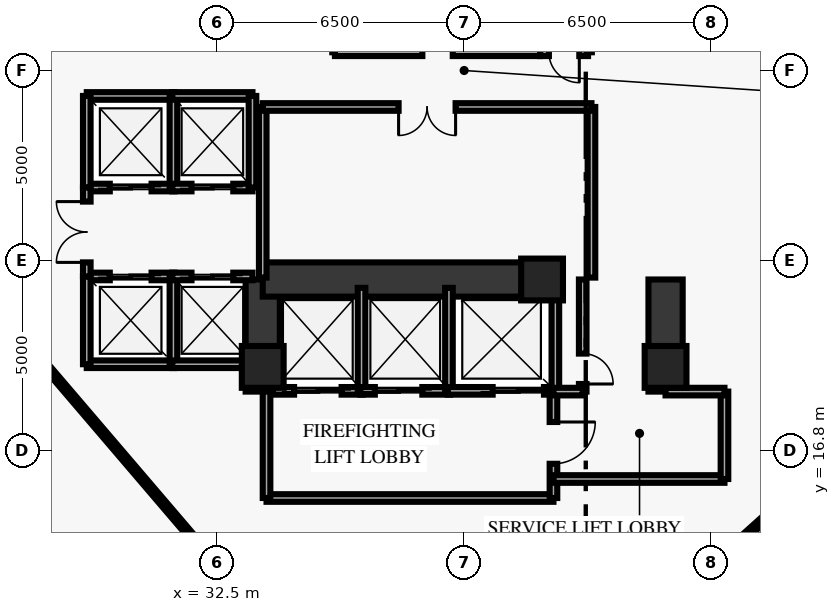
"""IFC4 building model, lengths in metres.
Left out: names, types, materials, properties, quantities, classifications, styles, units other than length and angle.
Written with IfcOpenShell. Run it as: python <this file> out.ifc"""

import sys

from ifc_helpers import new_model, si_unit, direction, frame, frame_2d, origin, origin_2d, place, context, subcontext, project, spatial, rectangle, extrude, element, fill, save


model = new_model("IFC4")
c1 = context("Model", 3, precision=1e-05, world=origin(), true_north=direction((0.0, 1.0)))
c2 = subcontext(c1, "Body", "Model", "MODEL_VIEW")
j1 = project(units=[si_unit("LENGTHUNIT", "METRE"), si_unit("PLANEANGLEUNIT", "RADIAN")], contexts=[c1])
p1 = place(None, origin())
s1 = spatial("IfcSite", under=j1, at=p1, CompositionType="ELEMENT")
p2 = place(p1, origin())
s2 = spatial("IfcBuilding", under=s1, at=p2, CompositionType="ELEMENT")
p3 = place(p2, frame((0.0, 0.0, -4.5)))
s3 = spatial("IfcBuildingStorey", under=s2, at=p3, CompositionType="ELEMENT", Elevation=-4.5)
for number, where, z_axis, x_axis in (
    (1, (33.7, 19.0, 0.0), (0.0, 0.0, 1.0), (1.0, 0.0, 0.0)),
    (2, (41.05, 21.3, 0.0), (0.0, 0.0, 1.0), (1.0, 0.0, 0.0)),
    (3, (44.3, 19.0, 0.0), (0.0, 0.0, 1.0), (1.0, 0.0, 0.0)),
):
    element("IfcColumn", number, at=place(p3, frame(where, z_axis=z_axis, x_axis=x_axis)), inside=s3, PredefinedType="PILASTER", context=c2, shape_type="SweptSolid", body=[
        extrude(rectangle(XDim=1.1, YDim=1.1, at=origin_2d()), origin(), (0.0, 0.0, 1.0), 4.18),
    ])
for number, where, z_axis, x_axis in (
    (4, (33.7, 18.35, 0.0), (0.0, 0.0, 1.0), (0.0, 1.0, 0.0)),
    (5, (44.3, 18.35, 0.0), (0.0, 0.0, 1.0), (0.0, 1.0, 0.0)),
):
    element("IfcWall", number, at=place(p3, frame(where, z_axis=z_axis, x_axis=x_axis)), inside=s3, PredefinedType="SHEAR", context=c2, shape_type="SweptSolid", body=[
        extrude(rectangle(XDim=2.95, YDim=0.9, at=frame_2d((1.475, 0.0))), origin(), (0.0, 0.0, 1.0), 4.18),
    ])
p4 = place(p3, frame((33.7, 21.3, 0.0), z_axis=(0.0, 0.0, 1.0), x_axis=(1.0, 0.0, 0.0)))
e6 = element("IfcWall", 6, at=p4, inside=s3, PredefinedType="SHEAR", context=c2, shape_type="SweptSolid", body=[
    extrude(rectangle(XDim=7.55, YDim=0.9, at=frame_2d((3.775, 0.0))), origin(), (0.0, 0.0, 1.0), 4.18),
])
p5 = place(p3, frame((41.0, 27.28, 0.0), z_axis=(0.0, 0.0, 1.0), x_axis=(1.0, 0.0, 0.0)))
e7 = element("IfcWall", 7, at=p5, inside=s3, PredefinedType="SOLIDWALL", context=c2, shape_type="SweptSolid", body=[
    extrude(rectangle(XDim=1.26, YDim=0.2, at=frame_2d((0.63, 0.0))), origin(), (0.0, 0.0, 1.0), 4.18),
])
p6 = place(p5, frame((0.23, 0.0, 0.0)))
e8 = element("IfcOpeningElement", 8, at=p6, cuts=e7, PredefinedType="OPENING", context=c2, shape_type="SweptSolid", body=[
    extrude(rectangle(XDim=0.8, YDim=2.05, at=frame_2d((0.4, 1.025))), frame((0.0, 0.11, 0.0), z_axis=(0.0, -1.0, 0.0), x_axis=(1.0, 0.0, 0.0)), (0.0, 0.0, 1.0), 0.22),
])
p7 = place(p3, frame((29.07, 23.72, 0.0), z_axis=(0.0, 0.0, 1.0), x_axis=(1.0, 0.0, 0.0)))
e9 = element("IfcWall", 9, at=p7, inside=s3, PredefinedType="SOLIDWALL", context=c2, shape_type="SweptSolid", body=[
    extrude(rectangle(XDim=2.31, YDim=0.2, at=frame_2d((1.155, 0.0))), origin(), (0.0, 0.0, 1.0), 4.18),
])
p8 = place(p7, frame((0.605, 0.0, 0.0)))
e10 = element("IfcOpeningElement", 10, at=p8, cuts=e9, PredefinedType="OPENING", context=c2, shape_type="SweptSolid", body=[
    extrude(rectangle(XDim=1.1, YDim=2.15, at=frame_2d((0.55, 1.075))), frame((0.0, 0.11, 0.0), z_axis=(0.0, -1.0, 0.0), x_axis=(1.0, 0.0, 0.0)), (0.0, 0.0, 1.0), 0.22),
])
p9 = place(p3, frame((29.07, 26.13, 0.0), z_axis=(0.0, 0.0, 1.0), x_axis=(1.0, 0.0, 0.0)))
e11 = element("IfcWall", 11, at=p9, inside=s3, PredefinedType="SOLIDWALL", context=c2, shape_type="SweptSolid", body=[
    extrude(rectangle(XDim=2.31, YDim=0.2, at=frame_2d((1.155, 0.0))), origin(), (0.0, 0.0, 1.0), 4.18),
])
for number, where, z_axis, x_axis in (
    (12, (29.07, 23.72, 0.0), (0.0, 0.0, 1.0), (0.0, 1.0, 0.0)),
    (13, (31.35, 23.72, 0.0), (0.0, 0.0, 1.0), (0.0, 1.0, 0.0)),
):
    element("IfcWall", number, at=place(p3, frame(where, z_axis=z_axis, x_axis=x_axis)), inside=s3, PredefinedType="SOLIDWALL", context=c2, shape_type="SweptSolid", body=[
        extrude(rectangle(XDim=2.41, YDim=0.2, at=frame_2d((1.205, 0.0))), origin(), (0.0, 0.0, 1.0), 4.18),
    ])
p10 = place(p3, frame((31.32, 23.72, 0.0), z_axis=(0.0, 0.0, 1.0), x_axis=(1.0, 0.0, 0.0)))
e14 = element("IfcWall", 14, at=p10, inside=s3, PredefinedType="SOLIDWALL", context=c2, shape_type="SweptSolid", body=[
    extrude(rectangle(XDim=2.11, YDim=0.2, at=frame_2d((1.055, 0.0))), origin(), (0.0, 0.0, 1.0), 4.18),
])
p11 = place(p10, frame((0.505, 0.0, 0.0)))
e15 = element("IfcOpeningElement", 15, at=p11, cuts=e14, PredefinedType="OPENING", context=c2, shape_type="SweptSolid", body=[
    extrude(rectangle(XDim=1.1, YDim=2.15, at=frame_2d((0.55, 1.075))), frame((0.0, 0.11, 0.0), z_axis=(0.0, -1.0, 0.0), x_axis=(1.0, 0.0, 0.0)), (0.0, 0.0, 1.0), 0.22),
])
p12 = place(p3, frame((31.32, 26.13, 0.0), z_axis=(0.0, 0.0, 1.0), x_axis=(1.0, 0.0, 0.0)))
e16 = element("IfcWall", 16, at=p12, inside=s3, PredefinedType="SOLIDWALL", context=c2, shape_type="SweptSolid", body=[
    extrude(rectangle(XDim=2.11, YDim=0.2, at=frame_2d((1.055, 0.0))), origin(), (0.0, 0.0, 1.0), 4.18),
])
p13 = place(p3, frame((33.43, 23.72, 0.0), z_axis=(0.0, 0.0, 1.0), x_axis=(0.0, 1.0, 0.0)))
e17 = element("IfcWall", 17, at=p13, inside=s3, PredefinedType="SOLIDWALL", context=c2, shape_type="SweptSolid", body=[
    extrude(rectangle(XDim=2.41, YDim=0.2, at=frame_2d((1.205, 0.0))), origin(), (0.0, 0.0, 1.0), 4.18),
])
p14 = place(p3, frame((29.07, 19.07, 0.0), z_axis=(0.0, 0.0, 1.0), x_axis=(1.0, 0.0, 0.0)))
e18 = element("IfcWall", 18, at=p14, inside=s3, PredefinedType="SOLIDWALL", context=c2, shape_type="SweptSolid", body=[
    extrude(rectangle(XDim=2.31, YDim=0.2, at=frame_2d((1.155, 0.0))), origin(), (0.0, 0.0, 1.0), 4.18),
])
p15 = place(p3, frame((29.07, 21.38, 0.0), z_axis=(0.0, 0.0, 1.0), x_axis=(1.0, 0.0, 0.0)))
e19 = element("IfcWall", 19, at=p15, inside=s3, PredefinedType="SOLIDWALL", context=c2, shape_type="SweptSolid", body=[
    extrude(rectangle(XDim=2.31, YDim=0.2, at=frame_2d((1.155, 0.0))), origin(), (0.0, 0.0, 1.0), 4.18),
])
p16 = place(p15, frame((0.605, 0.0, 0.0)))
e20 = element("IfcOpeningElement", 20, at=p16, cuts=e19, PredefinedType="OPENING", context=c2, shape_type="SweptSolid", body=[
    extrude(rectangle(XDim=1.1, YDim=2.15, at=frame_2d((0.55, 1.075))), frame((0.0, 0.11, 0.0), z_axis=(0.0, -1.0, 0.0), x_axis=(1.0, 0.0, 0.0)), (0.0, 0.0, 1.0), 0.22),
])
for number, where, z_axis, x_axis in (
    (21, (29.07, 19.07, 0.0), (0.0, 0.0, 1.0), (0.0, 1.0, 0.0)),
    (22, (31.35, 19.07, 0.0), (0.0, 0.0, 1.0), (0.0, 1.0, 0.0)),
):
    element("IfcWall", number, at=place(p3, frame(where, z_axis=z_axis, x_axis=x_axis)), inside=s3, PredefinedType="SOLIDWALL", context=c2, shape_type="SweptSolid", body=[
        extrude(rectangle(XDim=2.31, YDim=0.2, at=frame_2d((1.155, 0.0))), origin(), (0.0, 0.0, 1.0), 4.18),
    ])
p17 = place(p3, frame((31.32, 19.07, 0.0), z_axis=(0.0, 0.0, 1.0), x_axis=(1.0, 0.0, 0.0)))
e23 = element("IfcWall", 23, at=p17, inside=s3, PredefinedType="SOLIDWALL", context=c2, shape_type="SweptSolid", body=[
    extrude(rectangle(XDim=2.11, YDim=0.2, at=frame_2d((1.055, 0.0))), origin(), (0.0, 0.0, 1.0), 4.18),
])
p18 = place(p3, frame((31.32, 21.38, 0.0), z_axis=(0.0, 0.0, 1.0), x_axis=(1.0, 0.0, 0.0)))
e24 = element("IfcWall", 24, at=p18, inside=s3, PredefinedType="SOLIDWALL", context=c2, shape_type="SweptSolid", body=[
    extrude(rectangle(XDim=2.11, YDim=0.2, at=frame_2d((1.055, 0.0))), origin(), (0.0, 0.0, 1.0), 4.18),
])
p19 = place(p18, frame((0.505, 0.0, 0.0)))
e25 = element("IfcOpeningElement", 25, at=p19, cuts=e24, PredefinedType="OPENING", context=c2, shape_type="SweptSolid", body=[
    extrude(rectangle(XDim=1.1, YDim=2.15, at=frame_2d((0.55, 1.075))), frame((0.0, 0.11, 0.0), z_axis=(0.0, -1.0, 0.0), x_axis=(1.0, 0.0, 0.0)), (0.0, 0.0, 1.0), 0.22),
])
p20 = place(p3, frame((33.97, 18.37, 0.0), z_axis=(0.0, 0.0, 1.0), x_axis=(1.0, 0.0, 0.0)))
e26 = element("IfcWall", 26, at=p20, inside=s3, PredefinedType="SOLIDWALL", context=c2, shape_type="SweptSolid", body=[
    extrude(rectangle(XDim=2.36, YDim=0.2, at=frame_2d((1.18, 0.0))), origin(), (0.0, 0.0, 1.0), 4.18),
])
p21 = place(p20, frame((0.555, 0.0, 0.0)))
e27 = element("IfcOpeningElement", 27, at=p21, cuts=e26, PredefinedType="OPENING", context=c2, shape_type="SweptSolid", body=[
    extrude(rectangle(XDim=1.25, YDim=2.2, at=frame_2d((0.625, 1.1))), frame((0.0, 0.11, 0.0), z_axis=(0.0, -1.0, 0.0), x_axis=(1.0, 0.0, 0.0)), (0.0, 0.0, 1.0), 0.22),
])
p22 = place(p3, frame((36.3, 18.37, 0.0), z_axis=(0.0, 0.0, 1.0), x_axis=(0.0, 1.0, 0.0)))
e28 = element("IfcWall", 28, at=p22, inside=s3, PredefinedType="SOLIDWALL", context=c2, shape_type="SweptSolid", body=[
    extrude(rectangle(XDim=2.71, YDim=0.2, at=frame_2d((1.355, 0.0))), origin(), (0.0, 0.0, 1.0), 4.18),
])
p23 = place(p3, frame((36.27, 18.37, 0.0), z_axis=(0.0, 0.0, 1.0), x_axis=(1.0, 0.0, 0.0)))
e29 = element("IfcWall", 29, at=p23, inside=s3, PredefinedType="SOLIDWALL", context=c2, shape_type="SweptSolid", body=[
    extrude(rectangle(XDim=2.36, YDim=0.2, at=frame_2d((1.18, 0.0))), origin(), (0.0, 0.0, 1.0), 4.18),
])
p24 = place(p23, frame((0.38, 0.0, 0.0)))
e30 = element("IfcOpeningElement", 30, at=p24, cuts=e29, PredefinedType="OPENING", context=c2, shape_type="SweptSolid", body=[
    extrude(rectangle(XDim=1.25, YDim=2.2, at=frame_2d((0.625, 1.1))), frame((0.0, 0.11, 0.0), z_axis=(0.0, -1.0, 0.0), x_axis=(1.0, 0.0, 0.0)), (0.0, 0.0, 1.0), 0.22),
])
p25 = place(p3, frame((38.6, 18.37, 0.0), z_axis=(0.0, 0.0, 1.0), x_axis=(0.0, 1.0, 0.0)))
e31 = element("IfcWall", 31, at=p25, inside=s3, PredefinedType="SOLIDWALL", context=c2, shape_type="SweptSolid", body=[
    extrude(rectangle(XDim=2.71, YDim=0.2, at=frame_2d((1.355, 0.0))), origin(), (0.0, 0.0, 1.0), 4.18),
])
p26 = place(p3, frame((38.57, 18.37, 0.0), z_axis=(0.0, 0.0, 1.0), x_axis=(1.0, 0.0, 0.0)))
e32 = element("IfcWall", 32, at=p26, inside=s3, PredefinedType="SOLIDWALL", context=c2, shape_type="SweptSolid", body=[
    extrude(rectangle(XDim=2.83, YDim=0.2, at=frame_2d((1.415, 0.0))), origin(), (0.0, 0.0, 1.0), 4.18),
])
p27 = place(p26, frame((1.18, 0.0, 0.0)))
e33 = element("IfcOpeningElement", 33, at=p27, cuts=e32, PredefinedType="OPENING", context=c2, shape_type="SweptSolid", body=[
    extrude(rectangle(XDim=1.35, YDim=2.18, at=frame_2d((0.675, 1.09))), frame((0.0, 0.11, 0.0), z_axis=(0.0, -1.0, 0.0), x_axis=(1.0, 0.0, 0.0)), (0.0, 0.0, 1.0), 0.22),
])
p28 = place(p3, frame((41.4, 18.37, 0.0), z_axis=(0.0, 0.0, 1.0), x_axis=(0.0, 1.0, 0.0)))
e34 = element("IfcWall", 34, at=p28, inside=s3, PredefinedType="SOLIDWALL", context=c2, shape_type="SweptSolid", body=[
    extrude(rectangle(XDim=2.71, YDim=0.2, at=frame_2d((1.355, 0.0))), origin(), (0.0, 0.0, 1.0), 4.18),
])
p29 = place(p3, frame((29.07, 21.38, 0.0), z_axis=(0.0, 0.0, 1.0), x_axis=(0.0, 1.0, 0.0)))
e35 = element("IfcWall", 35, at=p29, inside=s3, PredefinedType="SOLIDWALL", context=c2, shape_type="SweptSolid", body=[
    extrude(rectangle(XDim=2.34, YDim=0.2, at=frame_2d((1.17, 0.0))), origin(), (0.0, 0.0, 1.0), 4.18),
])
p30 = place(p29, frame((0.37, 0.0, 0.0)))
e36 = element("IfcOpeningElement", 36, at=p30, cuts=e35, PredefinedType="OPENING", context=c2, shape_type="SweptSolid", body=[
    extrude(rectangle(XDim=1.6, YDim=2.2, at=frame_2d((0.8, 1.1))), frame((0.0, 0.11, 0.0), z_axis=(0.0, -1.0, 0.0), x_axis=(1.0, 0.0, 0.0)), (0.0, 0.0, 1.0), 0.22),
])
p31 = place(p3, frame((33.7, 21.35, 0.0), z_axis=(0.0, 0.0, 1.0), x_axis=(0.0, 1.0, 0.0)))
e37 = element("IfcWall", 37, at=p31, inside=s3, PredefinedType="SOLIDWALL", context=c2, shape_type="SweptSolid", body=[
    extrude(rectangle(XDim=4.49, YDim=0.2, at=frame_2d((2.245, 0.0))), origin(), (0.0, 0.0, 1.0), 3.4),
])
p32 = place(p3, frame((42.35, 21.35, 0.0), z_axis=(0.0, 0.0, 1.0), x_axis=(0.0, 1.0, 0.0)))
e38 = element("IfcWall", 38, at=p32, inside=s3, PredefinedType="SOLIDWALL", context=c2, shape_type="SweptSolid", body=[
    extrude(rectangle(XDim=4.49, YDim=0.2, at=frame_2d((2.245, 0.0))), origin(), (0.0, 0.0, 1.0), 4.18),
])
p33 = place(p3, frame((42.35, 25.84, 0.0), z_axis=(0.0, 0.0, 1.0), x_axis=(-1.0, 0.0, 0.0)))
e39 = element("IfcWall", 39, at=p33, inside=s3, PredefinedType="SOLIDWALL", context=c2, shape_type="SweptSolid", body=[
    extrude(rectangle(XDim=8.65, YDim=0.2, at=frame_2d((4.325, 0.0))), origin(), (0.0, 0.0, 1.0), 4.18),
])
p34 = place(p33, frame((3.575, 0.0, 0.0)))
e40 = element("IfcOpeningElement", 40, at=p34, cuts=e39, PredefinedType="OPENING", context=c2, shape_type="SweptSolid", body=[
    extrude(rectangle(XDim=1.5, YDim=2.2, at=frame_2d((0.75, 1.1))), frame((0.0, 0.11, 0.0), z_axis=(0.0, -1.0, 0.0), x_axis=(1.0, 0.0, 0.0)), (0.0, 0.0, 1.0), 0.22),
])
p35 = place(p3, frame((35.6, 27.28, 0.0), z_axis=(0.0, 0.0, 1.0), x_axis=(1.0, 0.0, 0.0)))
e41 = element("IfcWall", 41, at=p35, inside=s3, PredefinedType="SOLIDWALL", context=c2, shape_type="SweptSolid", body=[
    extrude(rectangle(XDim=5.4, YDim=0.2, at=frame_2d((2.7, 0.0))), origin(), (0.0, 0.0, 1.0), 4.18),
])
p36 = place(p35, frame((2.3, 0.0, 0.0)))
e42 = element("IfcOpeningElement", 42, at=p36, cuts=e41, PredefinedType="OPENING", context=c2, shape_type="SweptSolid", body=[
    extrude(rectangle(XDim=0.8, YDim=2.05, at=frame_2d((0.4, 1.025))), frame((0.0, 0.11, 0.0), z_axis=(0.0, -1.0, 0.0), x_axis=(1.0, 0.0, 0.0)), (0.0, 0.0, 1.0), 0.22),
])
p37 = place(p3, frame((33.8, 15.55, 0.0), z_axis=(0.0, 0.0, 1.0), x_axis=(1.0, 0.0, 0.0)))
e43 = element("IfcWall", 43, at=p37, inside=s3, PredefinedType="SOLIDWALL", context=c2, shape_type="SweptSolid", body=[
    extrude(rectangle(XDim=7.55, YDim=0.2, at=frame_2d((3.775, 0.0))), origin(), (0.0, 0.0, 1.0), 4.18),
])
p38 = place(p3, frame((33.8, 15.55, 0.0), z_axis=(0.0, 0.0, 1.0), x_axis=(0.0, 1.0, 0.0)))
e44 = element("IfcWall", 44, at=p38, inside=s3, PredefinedType="SOLIDWALL", context=c2, shape_type="SweptSolid", body=[
    extrude(rectangle(XDim=2.8, YDim=0.2, at=frame_2d((1.4, 0.0))), origin(), (0.0, 0.0, 1.0), 4.18),
])
p39 = place(p3, frame((41.35, 15.55, 0.0), z_axis=(0.0, 0.0, 1.0), x_axis=(0.0, 1.0, 0.0)))
e45 = element("IfcWall", 45, at=p39, inside=s3, PredefinedType="SOLIDWALL", context=c2, shape_type="SweptSolid", body=[
    extrude(rectangle(XDim=2.8, YDim=0.2, at=frame_2d((1.4, 0.0))), origin(), (0.0, 0.0, 1.0), 4.18),
])
p40 = place(p39, frame((0.9, 0.0, 0.0)))
e46 = element("IfcOpeningElement", 46, at=p40, cuts=e45, PredefinedType="OPENING", context=c2, shape_type="SweptSolid", body=[
    extrude(rectangle(XDim=1.1, YDim=2.15, at=frame_2d((0.55, 1.075))), frame((0.0, 0.11, 0.0), z_axis=(0.0, -1.0, 0.0), x_axis=(1.0, 0.0, 0.0)), (0.0, 0.0, 1.0), 0.22),
])
p41 = place(p3, frame((41.35, 16.05, 0.0), z_axis=(0.0, 0.0, 1.0), x_axis=(1.0, 0.0, 0.0)))
e47 = element("IfcWall", 47, at=p41, inside=s3, PredefinedType="SOLIDWALL", context=c2, shape_type="SweptSolid", body=[
    extrude(rectangle(XDim=4.5, YDim=0.2, at=frame_2d((2.25, 0.0))), origin(), (0.0, 0.0, 1.0), 4.18),
])
p42 = place(p3, frame((45.85, 16.05, 0.0), z_axis=(0.0, 0.0, 1.0), x_axis=(0.0, 1.0, 0.0)))
e48 = element("IfcWall", 48, at=p42, inside=s3, PredefinedType="SOLIDWALL", context=c2, shape_type="SweptSolid", body=[
    extrude(rectangle(XDim=2.3, YDim=0.2, at=frame_2d((1.15, 0.0))), origin(), (0.0, 0.0, 1.0), 4.18),
])
p43 = place(p3, frame((44.3, 18.35, 0.0), z_axis=(0.0, 0.0, 1.0), x_axis=(1.0, 0.0, 0.0)))
e49 = element("IfcWall", 49, at=p43, inside=s3, PredefinedType="SOLIDWALL", context=c2, shape_type="SweptSolid", body=[
    extrude(rectangle(XDim=1.55, YDim=0.2, at=frame_2d((0.775, 0.0))), origin(), (0.0, 0.0, 1.0), 4.18),
])
p44 = place(p3, frame((42.12, 18.35, 0.0), z_axis=(0.0, 0.0, 1.0), x_axis=(0.0, 1.0, 0.0)))
e50 = element("IfcWall", 50, at=p44, inside=s3, PredefinedType="SOLIDWALL", context=c2, shape_type="SweptSolid", body=[
    extrude(rectangle(XDim=2.95, YDim=0.2, at=frame_2d((1.475, 0.0))), origin(), (0.0, 0.0, 1.0), 4.18),
])
p45 = place(p44, frame((0.2, 0.0, 0.0)))
e51 = element("IfcOpeningElement", 51, at=p45, cuts=e50, PredefinedType="OPENING", context=c2, shape_type="SweptSolid", body=[
    extrude(rectangle(XDim=0.8, YDim=2.05, at=frame_2d((0.4, 1.025))), frame((0.0, 0.11, 0.0), z_axis=(0.0, -1.0, 0.0), x_axis=(1.0, 0.0, 0.0)), (0.0, 0.0, 1.0), 0.22),
])
p46 = place(p3, frame((41.35, 18.35, 0.0), z_axis=(0.0, 0.0, 1.0), x_axis=(1.0, 0.0, 0.0)))
e52 = element("IfcWall", 52, at=p46, inside=s3, PredefinedType="SOLIDWALL", context=c2, shape_type="SweptSolid", body=[
    extrude(rectangle(XDim=0.77, YDim=0.2, at=frame_2d((0.385, 0.0))), origin(), (0.0, 0.0, 1.0), 4.18),
])
p47 = place(p3, frame((27.811, 19.24, 0.0), z_axis=(0.0, 0.0, 1.0), x_axis=(0.649652680018, -0.760231145998, 0.0)))
e53 = element("IfcWall", 53, at=p47, inside=s3, PredefinedType="PARTITIONING", context=c2, shape_type="SweptSolid", body=[
    extrude(rectangle(XDim=7.279, YDim=0.16, at=frame_2d((3.64, 0.0))), origin(), (0.0, 0.0, 1.0), 4.18),
])
p48 = place(p3, frame((45.46, 13.706, 0.0), z_axis=(0.0, 0.0, 1.0), x_axis=(0.744066617248, 0.668105432621, 0.0)))
e54 = element("IfcWall", 54, at=p48, inside=s3, PredefinedType="PARTITIONING", context=c2, shape_type="SweptSolid", body=[
    extrude(rectangle(XDim=3.596, YDim=0.16, at=frame_2d((1.798, 0.0))), origin(), (0.0, 0.0, 1.0), 4.18),
])
p49 = place(p6, origin())
e55 = element("IfcDoor", 55, at=p49, inside=s3, OperationType="SINGLE_SWING_RIGHT", PredefinedType="DOOR", context=c2, shape_type="SweptSolid", body=[
    extrude(rectangle(XDim=0.8, YDim=2.05, at=frame_2d((0.4, 1.025))), frame((0.0, 0.025, 0.0), z_axis=(0.0, -1.0, 0.0), x_axis=(1.0, 0.0, 0.0)), (0.0, 0.0, 1.0), 0.05),
])
fill(e8, e55)
p50 = place(p8, origin())
e56 = element("IfcDoor", 56, at=p50, inside=s3, OperationType="DOUBLE_DOOR_SLIDING", PredefinedType="DOOR", context=c2, shape_type="SweptSolid", body=[
    extrude(rectangle(XDim=1.1, YDim=2.15, at=frame_2d((0.55, 1.075))), frame((0.0, 0.025, 0.0), z_axis=(0.0, -1.0, 0.0), x_axis=(1.0, 0.0, 0.0)), (0.0, 0.0, 1.0), 0.05),
])
fill(e10, e56)
p51 = place(p11, origin())
e57 = element("IfcDoor", 57, at=p51, inside=s3, OperationType="DOUBLE_DOOR_SLIDING", PredefinedType="DOOR", context=c2, shape_type="SweptSolid", body=[
    extrude(rectangle(XDim=1.1, YDim=2.15, at=frame_2d((0.55, 1.075))), frame((0.0, 0.025, 0.0), z_axis=(0.0, -1.0, 0.0), x_axis=(1.0, 0.0, 0.0)), (0.0, 0.0, 1.0), 0.05),
])
fill(e15, e57)
p52 = place(p16, origin())
e58 = element("IfcDoor", 58, at=p52, inside=s3, OperationType="DOUBLE_DOOR_SLIDING", PredefinedType="DOOR", context=c2, shape_type="SweptSolid", body=[
    extrude(rectangle(XDim=1.1, YDim=2.15, at=frame_2d((0.55, 1.075))), frame((0.0, 0.025, 0.0), z_axis=(0.0, -1.0, 0.0), x_axis=(1.0, 0.0, 0.0)), (0.0, 0.0, 1.0), 0.05),
])
fill(e20, e58)
p53 = place(p19, origin())
e59 = element("IfcDoor", 59, at=p53, inside=s3, OperationType="DOUBLE_DOOR_SLIDING", PredefinedType="DOOR", context=c2, shape_type="SweptSolid", body=[
    extrude(rectangle(XDim=1.1, YDim=2.15, at=frame_2d((0.55, 1.075))), frame((0.0, 0.025, 0.0), z_axis=(0.0, -1.0, 0.0), x_axis=(1.0, 0.0, 0.0)), (0.0, 0.0, 1.0), 0.05),
])
fill(e25, e59)
p54 = place(p21, origin())
e60 = element("IfcDoor", 60, at=p54, inside=s3, OperationType="DOUBLE_DOOR_SLIDING", PredefinedType="DOOR", context=c2, shape_type="SweptSolid", body=[
    extrude(rectangle(XDim=1.25, YDim=2.2, at=frame_2d((0.625, 1.1))), frame((0.0, 0.025, 0.0), z_axis=(0.0, -1.0, 0.0), x_axis=(1.0, 0.0, 0.0)), (0.0, 0.0, 1.0), 0.05),
])
fill(e27, e60)
p55 = place(p24, origin())
e61 = element("IfcDoor", 61, at=p55, inside=s3, OperationType="DOUBLE_DOOR_SLIDING", PredefinedType="DOOR", context=c2, shape_type="SweptSolid", body=[
    extrude(rectangle(XDim=1.25, YDim=2.2, at=frame_2d((0.625, 1.1))), frame((0.0, 0.025, 0.0), z_axis=(0.0, -1.0, 0.0), x_axis=(1.0, 0.0, 0.0)), (0.0, 0.0, 1.0), 0.05),
])
fill(e30, e61)
p56 = place(p27, origin())
e62 = element("IfcDoor", 62, at=p56, inside=s3, OperationType="DOUBLE_DOOR_SLIDING", PredefinedType="DOOR", context=c2, shape_type="SweptSolid", body=[
    extrude(rectangle(XDim=1.35, YDim=2.18, at=frame_2d((0.675, 1.09))), frame((0.0, 0.025, 0.0), z_axis=(0.0, -1.0, 0.0), x_axis=(1.0, 0.0, 0.0)), (0.0, 0.0, 1.0), 0.05),
])
fill(e33, e62)
p57 = place(p30, origin())
e63 = element("IfcDoor", 63, at=p57, inside=s3, OperationType="DOUBLE_DOOR_SINGLE_SWING", PredefinedType="DOOR", context=c2, shape_type="SweptSolid", body=[
    extrude(rectangle(XDim=1.6, YDim=2.2, at=frame_2d((0.8, 1.1))), frame((0.0, 0.025, 0.0), z_axis=(0.0, -1.0, 0.0), x_axis=(1.0, 0.0, 0.0)), (0.0, 0.0, 1.0), 0.05),
])
fill(e36, e63)
p58 = place(p34, origin())
e64 = element("IfcDoor", 64, at=p58, inside=s3, OperationType="DOUBLE_DOOR_SINGLE_SWING", PredefinedType="DOOR", context=c2, shape_type="SweptSolid", body=[
    extrude(rectangle(XDim=1.5, YDim=2.2, at=frame_2d((0.75, 1.1))), frame((0.0, 0.025, 0.0), z_axis=(0.0, -1.0, 0.0), x_axis=(1.0, 0.0, 0.0)), (0.0, 0.0, 1.0), 0.05),
])
fill(e40, e64)
p59 = place(p36, origin())
e65 = element("IfcDoor", 65, at=p59, inside=s3, OperationType="SINGLE_SWING_LEFT", PredefinedType="DOOR", context=c2, shape_type="SweptSolid", body=[
    extrude(rectangle(XDim=0.8, YDim=2.05, at=frame_2d((0.4, 1.025))), frame((0.0, 0.025, 0.0), z_axis=(0.0, -1.0, 0.0), x_axis=(1.0, 0.0, 0.0)), (0.0, 0.0, 1.0), 0.05),
])
fill(e42, e65)
p60 = place(p40, origin())
e66 = element("IfcDoor", 66, at=p60, inside=s3, OperationType="SINGLE_SWING_RIGHT", PredefinedType="DOOR", context=c2, shape_type="SweptSolid", body=[
    extrude(rectangle(XDim=1.1, YDim=2.15, at=frame_2d((0.55, 1.075))), frame((0.0, 0.025, 0.0), z_axis=(0.0, -1.0, 0.0), x_axis=(1.0, 0.0, 0.0)), (0.0, 0.0, 1.0), 0.05),
])
fill(e46, e66)
p61 = place(p45, origin())
e67 = element("IfcDoor", 67, at=p61, inside=s3, OperationType="SINGLE_SWING_LEFT", PredefinedType="DOOR", context=c2, shape_type="SweptSolid", body=[
    extrude(rectangle(XDim=0.8, YDim=2.05, at=frame_2d((0.4, 1.025))), frame((0.0, 0.025, 0.0), z_axis=(0.0, -1.0, 0.0), x_axis=(1.0, 0.0, 0.0)), (0.0, 0.0, 1.0), 0.05),
])
fill(e51, e67)
save(model, sys.argv[1])
